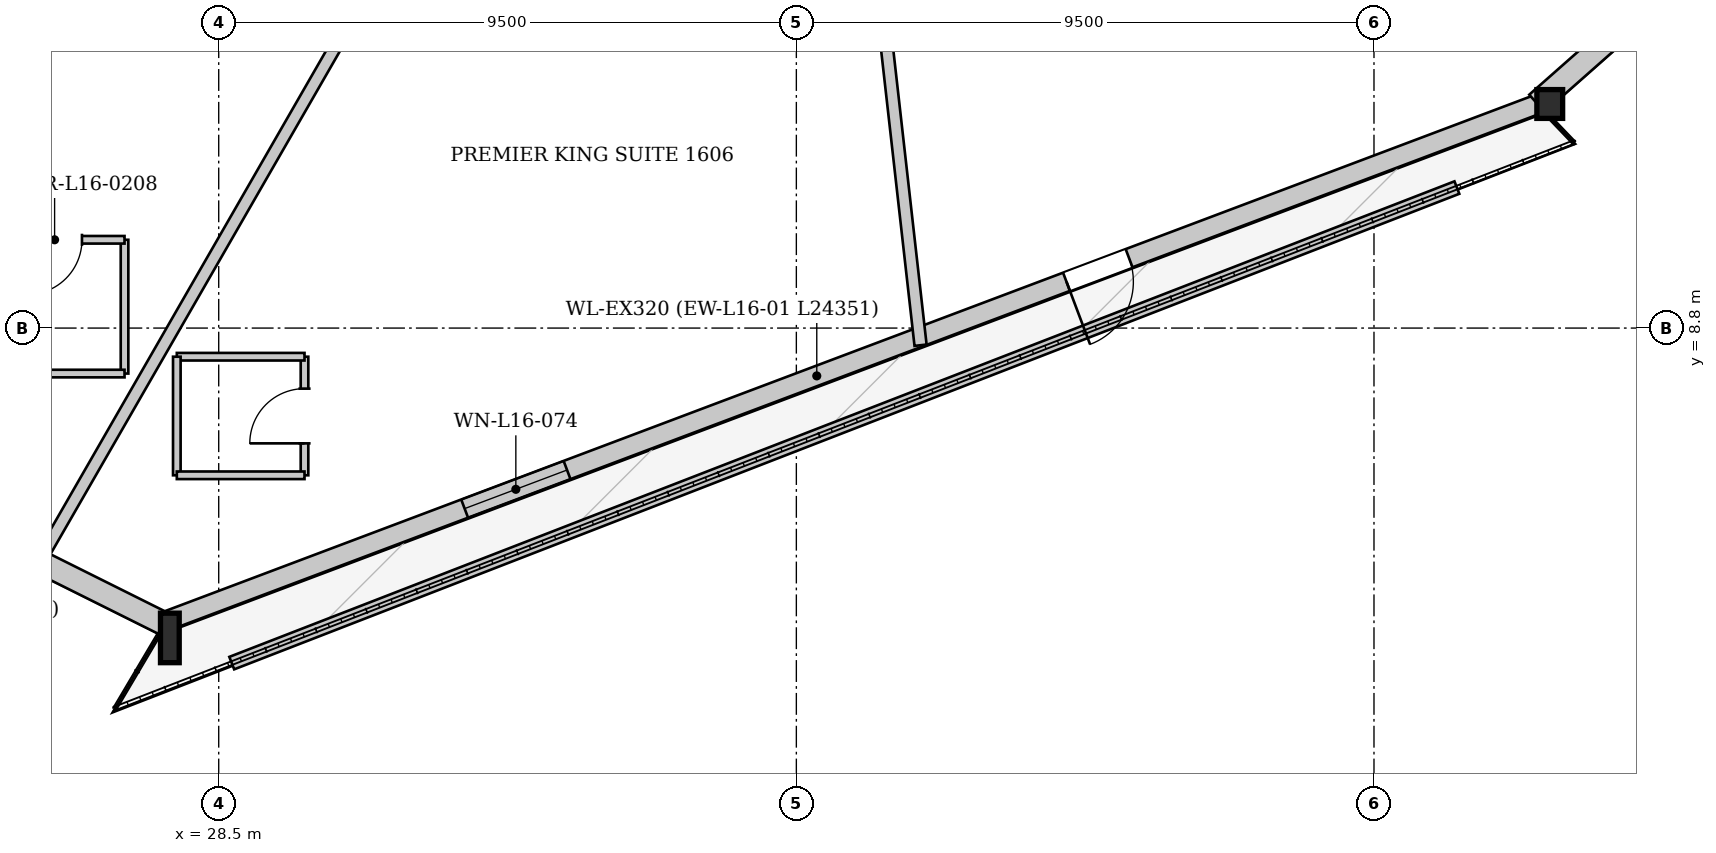
"""IFC4 building model, lengths in metres.
Left out: names, types, materials, properties, quantities, classifications, styles, units other than length and angle.
Written with IfcOpenShell. Run it as: python <this file> out.ifc"""

import sys

from ifc_helpers import new_model, si_unit, direction, frame, frame_2d, origin, origin_2d, place, context, subcontext, project, spatial, rectangle, i_section, extrude, source, transform, mapped, element, fill, save


model = new_model("IFC4")
c1 = context("Model", 3, precision=1e-05, world=origin(), true_north=direction((0.0, 1.0)))
c2 = subcontext(c1, "Body", "Model", "MODEL_VIEW")
j1 = project(units=[si_unit("LENGTHUNIT", "METRE"), si_unit("PLANEANGLEUNIT", "RADIAN")], contexts=[c1])
p1 = place(None, origin())
s1 = spatial("IfcSite", under=j1, at=p1, CompositionType="ELEMENT")
p2 = place(p1, origin())
s2 = spatial("IfcBuilding", under=s1, at=p2, CompositionType="ELEMENT")
p3 = place(p2, frame((0.0, 0.0, 64.8)))
s3 = spatial("IfcBuildingStorey", under=s2, at=p3, CompositionType="ELEMENT", Elevation=64.8)
m1 = source(origin(), c2, "Body", "SweptSolid", [
    extrude(i_section(OverallWidth=0.308, OverallDepth=0.814, WebThickness=0.021, FlangeThickness=0.04, at=origin_2d()), origin(), (0.0, 0.0, 1.0), 3.406),
])
p4 = place(p3, frame((27.518, 3.766, 0.0), z_axis=(0.10458259248, -0.036198909666, 0.993857193106), x_axis=(0.327088317834, 0.944993773703, 0.0)))
e1 = element("IfcColumn", 1, at=p4, inside=s3, PredefinedType="COLUMN", context=c2, shape_type="MappedRepresentation", body=[
    mapped(m1, transform((0.0, 0.0, 0.0), x_axis=(1.0, 0.0, 0.0), y_axis=(0.0, 1.0, 0.0), z_axis=(0.0, 0.0, 1.0), scale=1.0)),
])
m2 = source(origin(), c2, "Body", "SweptSolid", [
    extrude(i_section(OverallWidth=0.424, OverallDepth=0.474, WebThickness=0.043, FlangeThickness=0.068, at=origin_2d()), origin(), (0.0, 0.0, 1.0), 3.399),
])
p5 = place(p3, frame((50.305, 12.354, 0.0), z_axis=(0.050128014439, 0.077418337487, 0.995737708028), x_axis=(-0.839402988902, 0.543509541979, 0.0)))
e2 = element("IfcColumn", 2, at=p5, inside=s3, PredefinedType="COLUMN", context=c2, shape_type="MappedRepresentation", body=[
    mapped(m2, transform((0.0, 0.0, 0.0), x_axis=(1.0, 0.0, 0.0), y_axis=(0.0, 1.0, 0.0), z_axis=(0.0, 0.0, 1.0), scale=1.0)),
])
p6 = place(p3, frame((50.249, 12.503, 0.0), z_axis=(0.0, 0.0, 1.0), x_axis=(-0.935754406197, -0.352652366054, 0.0)))
e3 = element("IfcWall", 3, at=p6, inside=s3, PredefinedType="SOLIDWALL", context=c2, shape_type="SweptSolid", body=[
    extrude(rectangle(XDim=24.352, YDim=0.32, at=frame_2d((12.176, 0.0))), origin(), (0.0, 0.0, 1.0), 2.592),
])
p7 = place(p6, frame((7.242, 0.0, 0.0)))
e4 = element("IfcOpeningElement", 4, at=p7, cuts=e3, PredefinedType="OPENING", context=c2, shape_type="SweptSolid", body=[
    extrude(rectangle(XDim=1.1, YDim=2.3, at=frame_2d((0.55, 1.15))), frame((0.0, 0.17, 0.0), z_axis=(0.0, -1.0, 0.0), x_axis=(1.0, 0.0, 0.0)), (0.0, 0.0, 1.0), 0.34),
])
p8 = place(p6, frame((17.12, 0.0, 0.272)))
e5 = element("IfcOpeningElement", 5, at=p8, cuts=e3, PredefinedType="OPENING", context=c2, shape_type="SweptSolid", body=[
    extrude(rectangle(XDim=1.8, YDim=2.2, at=frame_2d((0.9, 1.1))), frame((0.0, 0.17, 0.0), z_axis=(0.0, -1.0, 0.0), x_axis=(1.0, 0.0, 0.0)), (0.0, 0.0, 1.0), 0.34),
])
p9 = place(p3, frame((27.603, 3.936, 0.0), z_axis=(0.0, 0.0, 1.0), x_axis=(-0.894929094808, 0.446208376508, 0.0)))
e6 = element("IfcWall", 6, at=p9, inside=s3, PredefinedType="SOLIDWALL", context=c2, shape_type="SweptSolid", body=[
    extrude(rectangle(XDim=5.928, YDim=0.38, at=frame_2d((2.964, 0.0))), origin(), (0.0, 0.0, 1.0), 2.592),
])
p10 = place(p3, frame((68.432, 28.615, 0.0), z_axis=(0.0, 0.0, 1.0), x_axis=(-0.749537297232, -0.661962113763, 0.0)))
e7 = element("IfcWall", 7, at=p10, inside=s3, PredefinedType="SOLIDWALL", context=c2, shape_type="SweptSolid", body=[
    extrude(rectangle(XDim=24.351, YDim=0.38, at=frame_2d((12.176, 0.0))), origin(), (0.0, 0.0, 1.0), 2.592),
])
p11 = place(p10, frame((5.718, 0.0, 0.222)))
e8 = element("IfcOpeningElement", 8, at=p11, cuts=e7, PredefinedType="OPENING", context=c2, shape_type="SweptSolid", body=[
    extrude(rectangle(XDim=2.2, YDim=2.25, at=frame_2d((1.1, 1.125))), frame((0.0, 0.2, 0.0), z_axis=(0.0, -1.0, 0.0), x_axis=(1.0, 0.0, 0.0)), (0.0, 0.0, 1.0), 0.4),
])
p12 = place(p10, frame((16.233, 0.0, 0.222)))
e9 = element("IfcOpeningElement", 9, at=p12, cuts=e7, PredefinedType="OPENING", context=c2, shape_type="SweptSolid", body=[
    extrude(rectangle(XDim=2.2, YDim=2.25, at=frame_2d((1.1, 1.125))), frame((0.0, 0.2, 0.0), z_axis=(0.0, -1.0, 0.0), x_axis=(1.0, 0.0, 0.0)), (0.0, 0.0, 1.0), 0.4),
])
p13 = place(p3, frame((28.714, 3.29, 0.0), z_axis=(0.0, 0.0, 1.0), x_axis=(0.932244858771, 0.361828030003, 0.0)))
e10 = element("IfcWall", 10, at=p13, inside=s3, PredefinedType="PARAPET", context=c2, shape_type="SweptSolid", body=[
    extrude(rectangle(XDim=21.613, YDim=0.22, at=frame_2d((10.807, 0.0))), origin(), (0.0, 0.0, 1.0), 0.3),
])
p14 = place(p3, frame((32.303, 16.7, 0.0), z_axis=(0.0, 0.0, 1.0), x_axis=(-0.498759278796, -0.866740550462, 0.0)))
e11 = element("IfcWall", 11, at=p14, inside=s3, PredefinedType="PARTITIONING", context=c2, shape_type="SweptSolid", body=[
    extrude(rectangle(XDim=13.704, YDim=0.2, at=frame_2d((6.852, 0.0))), origin(), (0.0, 0.0, 1.0), 3.3),
])
p15 = place(p3, frame((39.118, 16.7, 0.0), z_axis=(0.0, 0.0, 1.0), x_axis=(0.112253711385, -0.993679578275, 0.0)))
e12 = element("IfcWall", 12, at=p15, inside=s3, PredefinedType="PARTITIONING", context=c2, shape_type="SweptSolid", body=[
    extrude(rectangle(XDim=8.234, YDim=0.2, at=frame_2d((4.117, 0.0))), origin(), (0.0, 0.0, 1.0), 3.3),
])
p16 = place(p3, frame((26.951, 8.052, 0.0), z_axis=(0.0, 0.0, 1.0), x_axis=(0.0, 1.0, 0.0)))
e13 = element("IfcWall", 13, at=p16, inside=s3, PredefinedType="PARTITIONING", context=c2, shape_type="SweptSolid", body=[
    extrude(rectangle(XDim=2.2, YDim=0.125, at=frame_2d((1.1, 0.0))), origin(), (0.0, 0.0, 1.0), 3.3),
])
p17 = place(p3, frame((26.951, 10.252, 0.0), z_axis=(0.0, 0.0, 1.0), x_axis=(-1.0, 0.0, 0.0)))
e14 = element("IfcWall", 14, at=p17, inside=s3, PredefinedType="PARTITIONING", context=c2, shape_type="SweptSolid", body=[
    extrude(rectangle(XDim=2.3, YDim=0.125, at=frame_2d((1.15, 0.0))), origin(), (0.0, 0.0, 1.0), 3.3),
])
p18 = place(p17, frame((0.7, 0.0, 0.0)))
e15 = element("IfcOpeningElement", 15, at=p18, cuts=e14, PredefinedType="OPENING", context=c2, shape_type="SweptSolid", body=[
    extrude(rectangle(XDim=0.9, YDim=2.1, at=frame_2d((0.45, 1.05))), frame((0.0, 0.073, 0.0), z_axis=(0.0, -1.0, 0.0), x_axis=(1.0, 0.0, 0.0)), (0.0, 0.0, 1.0), 0.145),
])
p19 = place(p3, frame((24.651, 8.052, 0.0), z_axis=(0.0, 0.0, 1.0), x_axis=(1.0, 0.0, 0.0)))
e16 = element("IfcWall", 16, at=p19, inside=s3, PredefinedType="PARTITIONING", context=c2, shape_type="SweptSolid", body=[
    extrude(rectangle(XDim=2.3, YDim=0.125, at=frame_2d((1.15, 0.0))), origin(), (0.0, 0.0, 1.0), 3.3),
])
p20 = place(p3, frame((29.911, 6.379, 0.0), z_axis=(0.0, 0.0, 1.0), x_axis=(0.0, 1.0, 0.0)))
e17 = element("IfcWall", 17, at=p20, inside=s3, PredefinedType="PARTITIONING", context=c2, shape_type="SweptSolid", body=[
    extrude(rectangle(XDim=1.95, YDim=0.125, at=frame_2d((0.975, 0.0))), origin(), (0.0, 0.0, 1.0), 2.795),
])
p21 = place(p20, frame((0.525, 0.0, 0.0)))
e18 = element("IfcOpeningElement", 18, at=p21, cuts=e17, PredefinedType="OPENING", context=c2, shape_type="SweptSolid", body=[
    extrude(rectangle(XDim=0.9, YDim=2.1, at=frame_2d((0.45, 1.05))), frame((0.0, 0.073, 0.0), z_axis=(0.0, -1.0, 0.0), x_axis=(1.0, 0.0, 0.0)), (0.0, 0.0, 1.0), 0.145),
])
p22 = place(p3, frame((29.911, 8.329, 0.0), z_axis=(0.0, 0.0, 1.0), x_axis=(-1.0, 0.0, 0.0)))
e19 = element("IfcWall", 19, at=p22, inside=s3, PredefinedType="PARTITIONING", context=c2, shape_type="SweptSolid", body=[
    extrude(rectangle(XDim=2.1, YDim=0.125, at=frame_2d((1.05, 0.0))), origin(), (0.0, 0.0, 1.0), 3.3),
])
p23 = place(p3, frame((27.811, 8.329, 0.0), z_axis=(0.0, 0.0, 1.0), x_axis=(0.0, -1.0, 0.0)))
e20 = element("IfcWall", 20, at=p23, inside=s3, PredefinedType="PARTITIONING", context=c2, shape_type="SweptSolid", body=[
    extrude(rectangle(XDim=1.95, YDim=0.125, at=frame_2d((0.975, 0.0))), origin(), (0.0, 0.0, 1.0), 3.3),
])
p24 = place(p3, frame((27.811, 6.379, 0.0), z_axis=(0.0, 0.0, 1.0), x_axis=(1.0, 0.0, 0.0)))
e21 = element("IfcWall", 21, at=p24, inside=s3, PredefinedType="PARTITIONING", context=c2, shape_type="SweptSolid", body=[
    extrude(rectangle(XDim=2.1, YDim=0.125, at=frame_2d((1.05, 0.0))), origin(), (0.0, 0.0, 1.0), 3.3),
])
m3 = source(origin(), c2, "Body", "SweptSolid", [
    extrude(rectangle(XDim=1.1, YDim=2.3, at=frame_2d((0.55, 1.15))), frame((0.0, 0.025, 0.0), z_axis=(0.0, -1.0, 0.0), x_axis=(1.0, 0.0, 0.0)), (0.0, 0.0, 1.0), 0.05),
])
p25 = place(p7, origin())
e22 = element("IfcDoor", 22, at=p25, inside=s3, OperationType="SINGLE_SWING_RIGHT", PredefinedType="DOOR", context=c2, shape_type="MappedRepresentation", body=[
    mapped(m3, transform((0.0, 0.0, 0.0), x_axis=(1.0, 0.0, 0.0), y_axis=(0.0, 1.0, 0.0), z_axis=(0.0, 0.0, 1.0), scale=1.0)),
])
fill(e4, e22)
m4 = source(origin(), c2, "Body", "SweptSolid", [
    extrude(rectangle(XDim=1.8, YDim=2.2, at=frame_2d((0.9, 1.1))), frame((0.0, 0.03, 0.0), z_axis=(0.0, -1.0, 0.0), x_axis=(1.0, 0.0, 0.0)), (0.0, 0.0, 1.0), 0.06),
])
p26 = place(p8, origin())
e23 = element("IfcWindow", 23, at=p26, inside=s3, PartitioningType="SINGLE_PANEL", PredefinedType="WINDOW", context=c2, shape_type="MappedRepresentation", body=[
    mapped(m4, transform((0.0, 0.0, 0.0), x_axis=(1.0, 0.0, 0.0), y_axis=(0.0, 1.0, 0.0), z_axis=(0.0, 0.0, 1.0), scale=1.0)),
])
fill(e5, e23)
m5 = source(origin(), c2, "Body", "SweptSolid", [
    extrude(rectangle(XDim=0.9, YDim=2.1, at=frame_2d((0.45, 1.05))), frame((0.0, 0.025, 0.0), z_axis=(0.0, -1.0, 0.0), x_axis=(1.0, 0.0, 0.0)), (0.0, 0.0, 1.0), 0.05),
])
p27 = place(p18, origin())
e24 = element("IfcDoor", 24, at=p27, inside=s3, OperationType="SINGLE_SWING_RIGHT", PredefinedType="DOOR", context=c2, shape_type="MappedRepresentation", body=[
    mapped(m5, transform((0.0, 0.0, 0.0), x_axis=(1.0, 0.0, 0.0), y_axis=(0.0, 1.0, 0.0), z_axis=(0.0, 0.0, 1.0), scale=1.0)),
])
fill(e15, e24)
p28 = place(p21, origin())
e25 = element("IfcDoor", 25, at=p28, inside=s3, OperationType="SINGLE_SWING_LEFT", PredefinedType="DOOR", context=c2, shape_type="MappedRepresentation", body=[
    mapped(m5, transform((0.0, 0.0, 0.0), x_axis=(1.0, 0.0, 0.0), y_axis=(0.0, 1.0, 0.0), z_axis=(0.0, 0.0, 1.0), scale=1.0)),
])
fill(e18, e25)
save(model, sys.argv[1])
